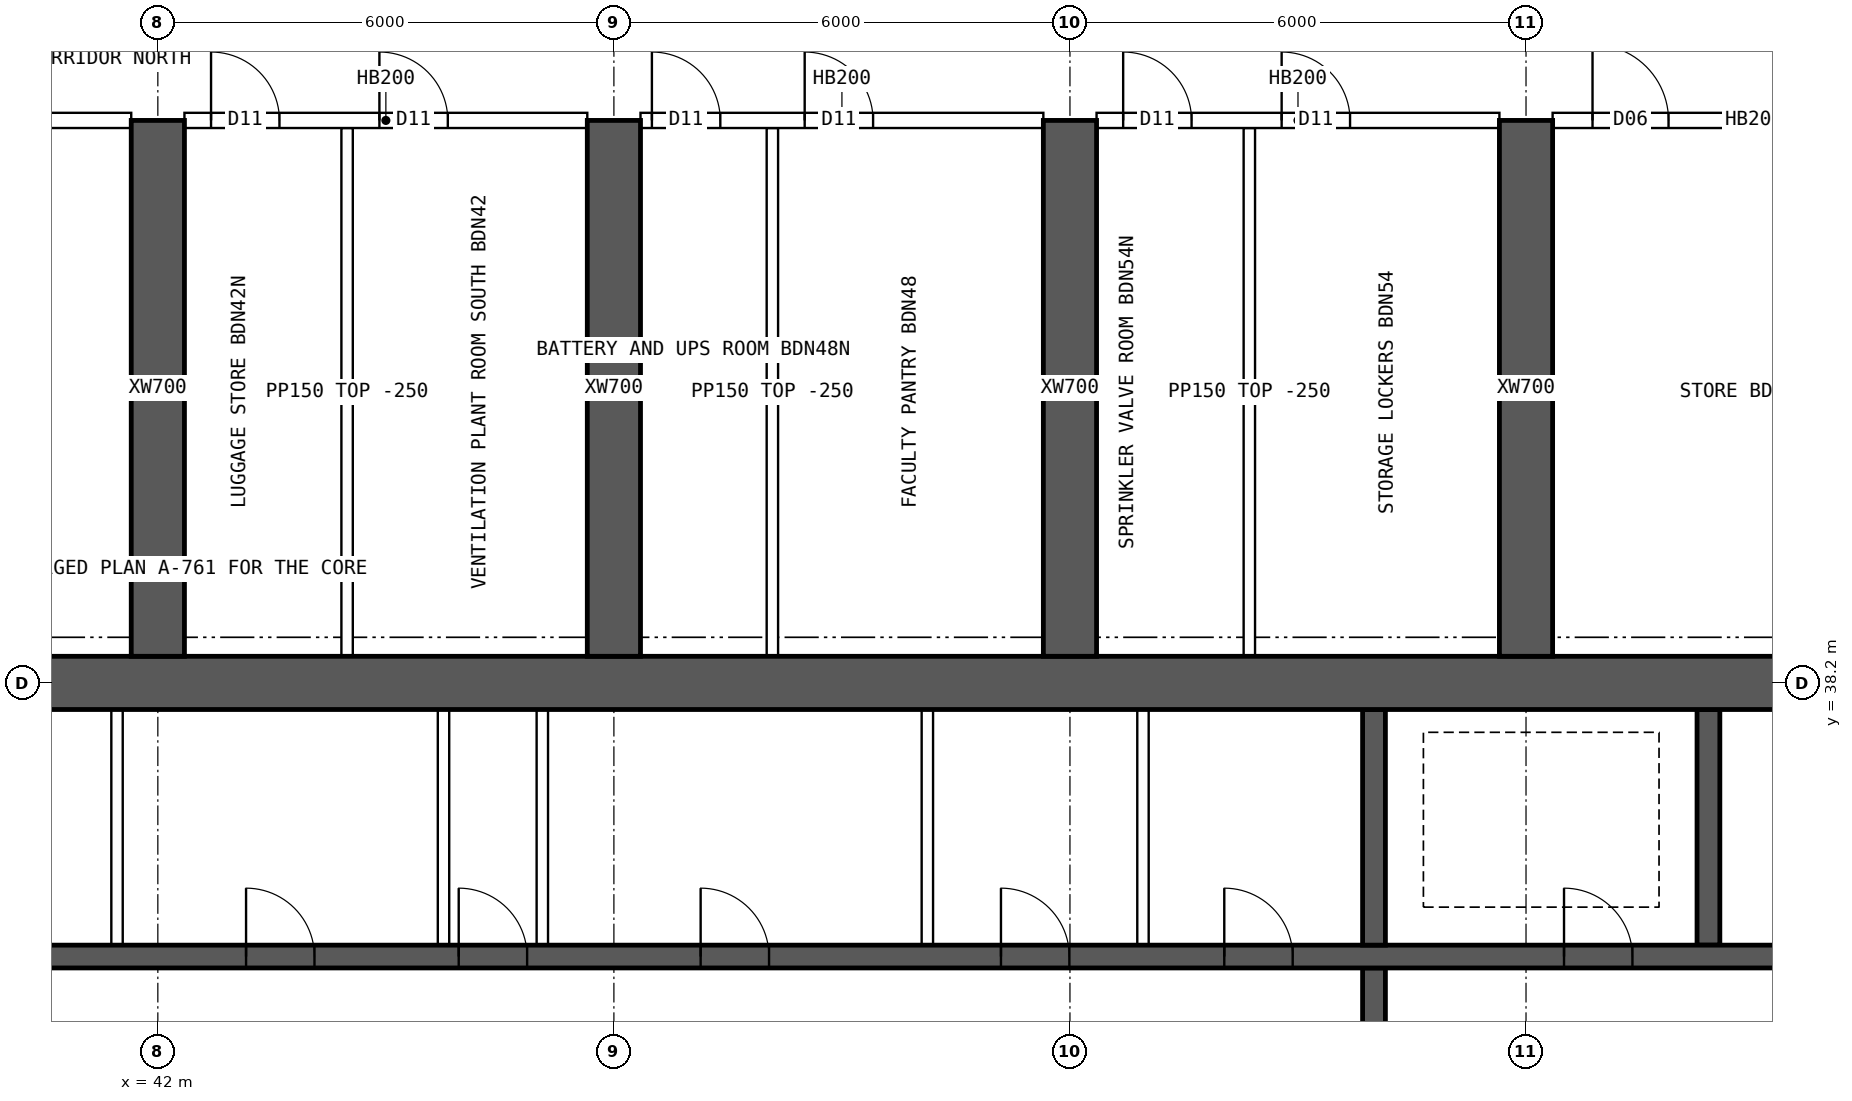
"""IFC4 building model, lengths in metres.
Left out: names, types, materials, properties, quantities, classifications, styles, units other than length and angle.
Written with IfcOpenShell. Run it as: python <this file> out.ifc"""

import sys

from ifc_helpers import new_model, si_unit, direction, frame, frame_2d, origin, place, context, subcontext, project, spatial, rectangle, extrude, element, fill, save


model = new_model("IFC4")
c1 = context("Model", 3, precision=1e-05, world=origin(), true_north=direction((0.0, 1.0)))
c2 = subcontext(c1, "Body", "Model", "MODEL_VIEW")
j1 = project(units=[si_unit("LENGTHUNIT", "METRE"), si_unit("PLANEANGLEUNIT", "RADIAN")], contexts=[c1])
p1 = place(None, origin())
s1 = spatial("IfcSite", under=j1, at=p1, CompositionType="ELEMENT")
p2 = place(p1, origin())
s2 = spatial("IfcBuilding", under=s1, at=p2, CompositionType="ELEMENT")
p3 = place(p2, frame((0.0, 0.0, 235.3)))
s3 = spatial("IfcBuildingStorey", under=s2, at=p3, CompositionType="ELEMENT", Elevation=235.3)
p4 = place(p3, frame((18.0, 38.2, 0.0), z_axis=(0.0, 0.0, 1.0), x_axis=(1.0, 0.0, 0.0)))
e1 = element("IfcWall", 1, at=p4, inside=s3, PredefinedType="SHEAR", context=c2, shape_type="SweptSolid", body=[
    extrude(rectangle(XDim=48.0, YDim=0.7, at=frame_2d((24.0, 0.0))), origin(), (0.0, 0.0, 1.0), 3.75),
])
p5 = place(p3, frame((18.35, 34.6, 0.0), z_axis=(0.0, 0.0, 1.0), x_axis=(1.0, 0.0, 0.0)))
e2 = element("IfcWall", 2, at=p5, inside=s3, PredefinedType="SHEAR", context=c2, shape_type="SweptSolid", body=[
    extrude(rectangle(XDim=47.3, YDim=0.3, at=frame_2d((23.65, 0.0))), origin(), (0.0, 0.0, 1.0), 3.75),
])
p6 = place(p5, frame((0.9, 0.0, 0.0)))
e3 = element("IfcOpeningElement", 3, at=p6, cuts=e2, PredefinedType="OPENING", context=c2, shape_type="SweptSolid", body=[
    extrude(rectangle(XDim=1.1, YDim=2.1, at=frame_2d((0.55, 1.05))), frame((0.0, 0.16, 0.0), z_axis=(0.0, -1.0, 0.0), x_axis=(1.0, 0.0, 0.0)), (0.0, 0.0, 1.0), 0.32),
])
p7 = place(p5, frame((45.3, 0.0, 0.0)))
e4 = element("IfcOpeningElement", 4, at=p7, cuts=e2, PredefinedType="OPENING", context=c2, shape_type="SweptSolid", body=[
    extrude(rectangle(XDim=1.1, YDim=2.1, at=frame_2d((0.55, 1.05))), frame((0.0, 0.16, 0.0), z_axis=(0.0, -1.0, 0.0), x_axis=(1.0, 0.0, 0.0)), (0.0, 0.0, 1.0), 0.32),
])
p8 = place(p5, frame((4.25, 0.0, 0.0)))
e5 = element("IfcOpeningElement", 5, at=p8, cuts=e2, PredefinedType="OPENING", context=c2, shape_type="SweptSolid", body=[
    extrude(rectangle(XDim=0.9, YDim=2.1, at=frame_2d((0.45, 1.05))), frame((0.0, 0.16, 0.0), z_axis=(0.0, -1.0, 0.0), x_axis=(1.0, 0.0, 0.0)), (0.0, 0.0, 1.0), 0.32),
])
p9 = place(p5, frame((42.15, 0.0, 0.0)))
e6 = element("IfcOpeningElement", 6, at=p9, cuts=e2, PredefinedType="OPENING", context=c2, shape_type="SweptSolid", body=[
    extrude(rectangle(XDim=0.9, YDim=2.1, at=frame_2d((0.45, 1.05))), frame((0.0, 0.16, 0.0), z_axis=(0.0, -1.0, 0.0), x_axis=(1.0, 0.0, 0.0)), (0.0, 0.0, 1.0), 0.32),
])
p10 = place(p5, frame((9.025, 0.0, 0.0)))
e7 = element("IfcOpeningElement", 7, at=p10, cuts=e2, PredefinedType="OPENING", context=c2, shape_type="SweptSolid", body=[
    extrude(rectangle(XDim=0.9, YDim=2.1, at=frame_2d((0.45, 1.05))), frame((0.0, 0.16, 0.0), z_axis=(0.0, -1.0, 0.0), x_axis=(1.0, 0.0, 0.0)), (0.0, 0.0, 1.0), 0.32),
])
p11 = place(p5, frame((12.999, 0.0, 0.0)))
e8 = element("IfcOpeningElement", 8, at=p11, cuts=e2, PredefinedType="OPENING", context=c2, shape_type="SweptSolid", body=[
    extrude(rectangle(XDim=0.9, YDim=2.1, at=frame_2d((0.45, 1.05))), frame((0.0, 0.16, 0.0), z_axis=(0.0, -1.0, 0.0), x_axis=(1.0, 0.0, 0.0)), (0.0, 0.0, 1.0), 0.32),
])
p12 = place(p5, frame((16.646, 0.0, 0.0)))
e9 = element("IfcOpeningElement", 9, at=p12, cuts=e2, PredefinedType="OPENING", context=c2, shape_type="SweptSolid", body=[
    extrude(rectangle(XDim=0.9, YDim=2.1, at=frame_2d((0.45, 1.05))), frame((0.0, 0.16, 0.0), z_axis=(0.0, -1.0, 0.0), x_axis=(1.0, 0.0, 0.0)), (0.0, 0.0, 1.0), 0.32),
])
p13 = place(p5, frame((20.405, 0.0, 0.0)))
e10 = element("IfcOpeningElement", 10, at=p13, cuts=e2, PredefinedType="OPENING", context=c2, shape_type="SweptSolid", body=[
    extrude(rectangle(XDim=0.9, YDim=2.1, at=frame_2d((0.45, 1.05))), frame((0.0, 0.16, 0.0), z_axis=(0.0, -1.0, 0.0), x_axis=(1.0, 0.0, 0.0)), (0.0, 0.0, 1.0), 0.32),
])
p14 = place(p5, frame((24.811, 0.0, 0.0)))
e11 = element("IfcOpeningElement", 11, at=p14, cuts=e2, PredefinedType="OPENING", context=c2, shape_type="SweptSolid", body=[
    extrude(rectangle(XDim=0.9, YDim=2.1, at=frame_2d((0.45, 1.05))), frame((0.0, 0.16, 0.0), z_axis=(0.0, -1.0, 0.0), x_axis=(1.0, 0.0, 0.0)), (0.0, 0.0, 1.0), 0.32),
])
p15 = place(p5, frame((27.608, 0.0, 0.0)))
e12 = element("IfcOpeningElement", 12, at=p15, cuts=e2, PredefinedType="OPENING", context=c2, shape_type="SweptSolid", body=[
    extrude(rectangle(XDim=0.9, YDim=2.1, at=frame_2d((0.45, 1.05))), frame((0.0, 0.16, 0.0), z_axis=(0.0, -1.0, 0.0), x_axis=(1.0, 0.0, 0.0)), (0.0, 0.0, 1.0), 0.32),
])
p16 = place(p5, frame((30.791, 0.0, 0.0)))
e13 = element("IfcOpeningElement", 13, at=p16, cuts=e2, PredefinedType="OPENING", context=c2, shape_type="SweptSolid", body=[
    extrude(rectangle(XDim=0.9, YDim=2.1, at=frame_2d((0.45, 1.05))), frame((0.0, 0.16, 0.0), z_axis=(0.0, -1.0, 0.0), x_axis=(1.0, 0.0, 0.0)), (0.0, 0.0, 1.0), 0.32),
])
p17 = place(p5, frame((34.742, 0.0, 0.0)))
e14 = element("IfcOpeningElement", 14, at=p17, cuts=e2, PredefinedType="OPENING", context=c2, shape_type="SweptSolid", body=[
    extrude(rectangle(XDim=0.9, YDim=2.1, at=frame_2d((0.45, 1.05))), frame((0.0, 0.16, 0.0), z_axis=(0.0, -1.0, 0.0), x_axis=(1.0, 0.0, 0.0)), (0.0, 0.0, 1.0), 0.32),
])
p18 = place(p5, frame((37.68, 0.0, 0.0)))
e15 = element("IfcOpeningElement", 15, at=p18, cuts=e2, PredefinedType="OPENING", context=c2, shape_type="SweptSolid", body=[
    extrude(rectangle(XDim=0.9, YDim=2.1, at=frame_2d((0.45, 1.05))), frame((0.0, 0.16, 0.0), z_axis=(0.0, -1.0, 0.0), x_axis=(1.0, 0.0, 0.0)), (0.0, 0.0, 1.0), 0.32),
])
p19 = place(p3, frame((58.0, 30.55, 0.0), z_axis=(0.0, 0.0, 1.0), x_axis=(0.0, 1.0, 0.0)))
e16 = element("IfcWall", 16, at=p19, inside=s3, PredefinedType="SHEAR", context=c2, shape_type="SweptSolid", body=[
    extrude(rectangle(XDim=3.9, YDim=0.3, at=frame_2d((1.95, 0.0))), origin(), (0.0, 0.0, 1.0), 3.75),
])
p20 = place(p19, frame((1.4, 0.0, 0.0)))
e17 = element("IfcOpeningElement", 17, at=p20, cuts=e16, PredefinedType="OPENING", context=c2, shape_type="SweptSolid", body=[
    extrude(rectangle(XDim=1.2, YDim=2.1, at=frame_2d((0.6, 1.05))), frame((0.0, 0.16, 0.0), z_axis=(0.0, -1.0, 0.0), x_axis=(1.0, 0.0, 0.0)), (0.0, 0.0, 1.0), 0.32),
])
for number, where, z_axis, x_axis in (
    (18, (62.4, 34.75, 0.0), (0.0, 0.0, 1.0), (0.0, 1.0, 0.0)),
    (19, (58.0, 34.75, 0.0), (0.0, 0.0, 1.0), (0.0, 1.0, 0.0)),
):
    element("IfcWall", number, at=place(p3, frame(where, z_axis=z_axis, x_axis=x_axis)), inside=s3, PredefinedType="SHEAR", context=c2, shape_type="SweptSolid", body=[
        extrude(rectangle(XDim=3.1, YDim=0.3, at=frame_2d((1.55, 0.0))), origin(), (0.0, 0.0, 1.0), 3.75),
    ])
for number, where, z_axis, x_axis in (
    (20, (42.0, 38.55, 0.0), (0.0, 0.0, 1.0), (0.0, 1.0, 0.0)),
    (21, (48.0, 38.55, 0.0), (0.0, 0.0, 1.0), (0.0, 1.0, 0.0)),
    (22, (54.0, 38.55, 0.0), (0.0, 0.0, 1.0), (0.0, 1.0, 0.0)),
    (23, (60.0, 38.55, 0.0), (0.0, 0.0, 1.0), (0.0, 1.0, 0.0)),
):
    element("IfcWall", number, at=place(p3, frame(where, z_axis=z_axis, x_axis=x_axis)), inside=s3, PredefinedType="SHEAR", context=c2, shape_type="SweptSolid", body=[
        extrude(rectangle(XDim=7.05, YDim=0.7, at=frame_2d((3.525, 0.0))), origin(), (0.0, 0.0, 1.0), 3.75),
    ])
for number, where, z_axis, x_axis in (
    (24, (41.463, 34.75, 0.0), (0.0, 0.0, 1.0), (0.0, 1.0, 0.0)),
    (25, (45.758, 34.75, 0.0), (0.0, 0.0, 1.0), (0.0, 1.0, 0.0)),
    (26, (47.058, 34.75, 0.0), (0.0, 0.0, 1.0), (0.0, 1.0, 0.0)),
    (27, (52.124, 34.75, 0.0), (0.0, 0.0, 1.0), (0.0, 1.0, 0.0)),
    (28, (54.961, 34.75, 0.0), (0.0, 0.0, 1.0), (0.0, 1.0, 0.0)),
):
    element("IfcWall", number, at=place(p3, frame(where, z_axis=z_axis, x_axis=x_axis)), inside=s3, PredefinedType="SOLIDWALL", context=c2, shape_type="SweptSolid", body=[
        extrude(rectangle(XDim=3.1, YDim=0.15, at=frame_2d((1.55, 0.0))), origin(), (0.0, 0.0, 1.0), 3.5),
    ])
p21 = place(p3, frame((36.35, 45.6, 0.0), z_axis=(0.0, 0.0, 1.0), x_axis=(1.0, 0.0, 0.0)))
e29 = element("IfcWall", 29, at=p21, inside=s3, PredefinedType="SOLIDWALL", context=c2, shape_type="SweptSolid", body=[
    extrude(rectangle(XDim=5.3, YDim=0.2, at=frame_2d((2.65, 0.0))), origin(), (0.0, 0.0, 1.0), 3.5),
])
p22 = place(p21, frame((0.15, 0.0, 0.0)))
e30 = element("IfcOpeningElement", 30, at=p22, cuts=e29, PredefinedType="OPENING", context=c2, shape_type="SweptSolid", body=[
    extrude(rectangle(XDim=0.9, YDim=2.1, at=frame_2d((0.45, 1.05))), frame((0.0, 0.11, 0.0), z_axis=(0.0, -1.0, 0.0), x_axis=(1.0, 0.0, 0.0)), (0.0, 0.0, 1.0), 0.22),
])
p23 = place(p21, frame((2.34, 0.0, 0.0)))
e31 = element("IfcOpeningElement", 31, at=p23, cuts=e29, PredefinedType="OPENING", context=c2, shape_type="SweptSolid", body=[
    extrude(rectangle(XDim=0.9, YDim=2.1, at=frame_2d((0.45, 1.05))), frame((0.0, 0.11, 0.0), z_axis=(0.0, -1.0, 0.0), x_axis=(1.0, 0.0, 0.0)), (0.0, 0.0, 1.0), 0.22),
])
p24 = place(p3, frame((42.35, 45.6, 0.0), z_axis=(0.0, 0.0, 1.0), x_axis=(1.0, 0.0, 0.0)))
e32 = element("IfcWall", 32, at=p24, inside=s3, PredefinedType="SOLIDWALL", context=c2, shape_type="SweptSolid", body=[
    extrude(rectangle(XDim=5.3, YDim=0.2, at=frame_2d((2.65, 0.0))), origin(), (0.0, 0.0, 1.0), 3.5),
])
p25 = place(p24, frame((0.35, 0.0, 0.0)))
e33 = element("IfcOpeningElement", 33, at=p25, cuts=e32, PredefinedType="OPENING", context=c2, shape_type="SweptSolid", body=[
    extrude(rectangle(XDim=0.9, YDim=2.1, at=frame_2d((0.45, 1.05))), frame((0.0, 0.11, 0.0), z_axis=(0.0, -1.0, 0.0), x_axis=(1.0, 0.0, 0.0)), (0.0, 0.0, 1.0), 0.22),
])
p26 = place(p24, frame((2.565, 0.0, 0.0)))
e34 = element("IfcOpeningElement", 34, at=p26, cuts=e32, PredefinedType="OPENING", context=c2, shape_type="SweptSolid", body=[
    extrude(rectangle(XDim=0.9, YDim=2.1, at=frame_2d((0.45, 1.05))), frame((0.0, 0.11, 0.0), z_axis=(0.0, -1.0, 0.0), x_axis=(1.0, 0.0, 0.0)), (0.0, 0.0, 1.0), 0.22),
])
p27 = place(p3, frame((48.35, 45.6, 0.0), z_axis=(0.0, 0.0, 1.0), x_axis=(1.0, 0.0, 0.0)))
e35 = element("IfcWall", 35, at=p27, inside=s3, PredefinedType="SOLIDWALL", context=c2, shape_type="SweptSolid", body=[
    extrude(rectangle(XDim=5.3, YDim=0.2, at=frame_2d((2.65, 0.0))), origin(), (0.0, 0.0, 1.0), 3.5),
])
p28 = place(p27, frame((0.15, 0.0, 0.0)))
e36 = element("IfcOpeningElement", 36, at=p28, cuts=e35, PredefinedType="OPENING", context=c2, shape_type="SweptSolid", body=[
    extrude(rectangle(XDim=0.9, YDim=2.1, at=frame_2d((0.45, 1.05))), frame((0.0, 0.11, 0.0), z_axis=(0.0, -1.0, 0.0), x_axis=(1.0, 0.0, 0.0)), (0.0, 0.0, 1.0), 0.22),
])
p29 = place(p27, frame((2.16, 0.0, 0.0)))
e37 = element("IfcOpeningElement", 37, at=p29, cuts=e35, PredefinedType="OPENING", context=c2, shape_type="SweptSolid", body=[
    extrude(rectangle(XDim=0.9, YDim=2.1, at=frame_2d((0.45, 1.05))), frame((0.0, 0.11, 0.0), z_axis=(0.0, -1.0, 0.0), x_axis=(1.0, 0.0, 0.0)), (0.0, 0.0, 1.0), 0.22),
])
p30 = place(p3, frame((54.35, 45.6, 0.0), z_axis=(0.0, 0.0, 1.0), x_axis=(1.0, 0.0, 0.0)))
e38 = element("IfcWall", 38, at=p30, inside=s3, PredefinedType="SOLIDWALL", context=c2, shape_type="SweptSolid", body=[
    extrude(rectangle(XDim=5.3, YDim=0.2, at=frame_2d((2.65, 0.0))), origin(), (0.0, 0.0, 1.0), 3.5),
])
p31 = place(p30, frame((0.35, 0.0, 0.0)))
e39 = element("IfcOpeningElement", 39, at=p31, cuts=e38, PredefinedType="OPENING", context=c2, shape_type="SweptSolid", body=[
    extrude(rectangle(XDim=0.9, YDim=2.1, at=frame_2d((0.45, 1.05))), frame((0.0, 0.11, 0.0), z_axis=(0.0, -1.0, 0.0), x_axis=(1.0, 0.0, 0.0)), (0.0, 0.0, 1.0), 0.22),
])
p32 = place(p30, frame((2.435, 0.0, 0.0)))
e40 = element("IfcOpeningElement", 40, at=p32, cuts=e38, PredefinedType="OPENING", context=c2, shape_type="SweptSolid", body=[
    extrude(rectangle(XDim=0.9, YDim=2.1, at=frame_2d((0.45, 1.05))), frame((0.0, 0.11, 0.0), z_axis=(0.0, -1.0, 0.0), x_axis=(1.0, 0.0, 0.0)), (0.0, 0.0, 1.0), 0.22),
])
p33 = place(p3, frame((60.35, 45.6, 0.0), z_axis=(0.0, 0.0, 1.0), x_axis=(1.0, 0.0, 0.0)))
e41 = element("IfcWall", 41, at=p33, inside=s3, PredefinedType="SOLIDWALL", context=c2, shape_type="SweptSolid", body=[
    extrude(rectangle(XDim=5.3, YDim=0.2, at=frame_2d((2.65, 0.0))), origin(), (0.0, 0.0, 1.0), 3.5),
])
p34 = place(p33, frame((0.525, 0.0, 0.0)))
e42 = element("IfcOpeningElement", 42, at=p34, cuts=e41, PredefinedType="OPENING", context=c2, shape_type="SweptSolid", body=[
    extrude(rectangle(XDim=1.0, YDim=2.1, at=frame_2d((0.5, 1.05))), frame((0.0, 0.11, 0.0), z_axis=(0.0, -1.0, 0.0), x_axis=(1.0, 0.0, 0.0)), (0.0, 0.0, 1.0), 0.22),
])
for number, where, z_axis, x_axis in (
    (43, (44.49, 38.55, 0.0), (0.0, 0.0, 1.0), (0.0, 1.0, 0.0)),
    (44, (50.085, 38.55, 0.0), (0.0, 0.0, 1.0), (0.0, 1.0, 0.0)),
    (45, (56.36, 38.55, 0.0), (0.0, 0.0, 1.0), (0.0, 1.0, 0.0)),
):
    element("IfcWall", number, at=place(p3, frame(where, z_axis=z_axis, x_axis=x_axis)), inside=s3, PredefinedType="PARTITIONING", context=c2, shape_type="SweptSolid", body=[
        extrude(rectangle(XDim=6.95, YDim=0.15, at=frame_2d((3.475, 0.0))), origin(), (0.0, 0.0, 1.0), 3.5),
    ])
p35 = place(p9, origin())
e46 = element("IfcDoor", 46, at=p35, inside=s3, OperationType="SINGLE_SWING_LEFT", PredefinedType="DOOR", context=c2, shape_type="SweptSolid", body=[
    extrude(rectangle(XDim=0.9, YDim=2.1, at=frame_2d((0.45, 1.05))), frame((0.0, 0.025, 0.0), z_axis=(0.0, -1.0, 0.0), x_axis=(1.0, 0.0, 0.0)), (0.0, 0.0, 1.0), 0.05),
])
fill(e6, e46)
p36 = place(p14, origin())
e47 = element("IfcDoor", 47, at=p36, inside=s3, OperationType="SINGLE_SWING_LEFT", PredefinedType="DOOR", context=c2, shape_type="SweptSolid", body=[
    extrude(rectangle(XDim=0.9, YDim=2.1, at=frame_2d((0.45, 1.05))), frame((0.0, 0.025, 0.0), z_axis=(0.0, -1.0, 0.0), x_axis=(1.0, 0.0, 0.0)), (0.0, 0.0, 1.0), 0.05),
])
fill(e11, e47)
p37 = place(p15, origin())
e48 = element("IfcDoor", 48, at=p37, inside=s3, OperationType="SINGLE_SWING_LEFT", PredefinedType="DOOR", context=c2, shape_type="SweptSolid", body=[
    extrude(rectangle(XDim=0.9, YDim=2.1, at=frame_2d((0.45, 1.05))), frame((0.0, 0.025, 0.0), z_axis=(0.0, -1.0, 0.0), x_axis=(1.0, 0.0, 0.0)), (0.0, 0.0, 1.0), 0.05),
])
fill(e12, e48)
p38 = place(p16, origin())
e49 = element("IfcDoor", 49, at=p38, inside=s3, OperationType="SINGLE_SWING_LEFT", PredefinedType="DOOR", context=c2, shape_type="SweptSolid", body=[
    extrude(rectangle(XDim=0.9, YDim=2.1, at=frame_2d((0.45, 1.05))), frame((0.0, 0.025, 0.0), z_axis=(0.0, -1.0, 0.0), x_axis=(1.0, 0.0, 0.0)), (0.0, 0.0, 1.0), 0.05),
])
fill(e13, e49)
p39 = place(p17, origin())
e50 = element("IfcDoor", 50, at=p39, inside=s3, OperationType="SINGLE_SWING_LEFT", PredefinedType="DOOR", context=c2, shape_type="SweptSolid", body=[
    extrude(rectangle(XDim=0.9, YDim=2.1, at=frame_2d((0.45, 1.05))), frame((0.0, 0.025, 0.0), z_axis=(0.0, -1.0, 0.0), x_axis=(1.0, 0.0, 0.0)), (0.0, 0.0, 1.0), 0.05),
])
fill(e14, e50)
p40 = place(p18, origin())
e51 = element("IfcDoor", 51, at=p40, inside=s3, OperationType="SINGLE_SWING_LEFT", PredefinedType="DOOR", context=c2, shape_type="SweptSolid", body=[
    extrude(rectangle(XDim=0.9, YDim=2.1, at=frame_2d((0.45, 1.05))), frame((0.0, 0.025, 0.0), z_axis=(0.0, -1.0, 0.0), x_axis=(1.0, 0.0, 0.0)), (0.0, 0.0, 1.0), 0.05),
])
fill(e15, e51)
p41 = place(p25, origin())
e52 = element("IfcDoor", 52, at=p41, inside=s3, OperationType="SINGLE_SWING_LEFT", PredefinedType="DOOR", context=c2, shape_type="SweptSolid", body=[
    extrude(rectangle(XDim=0.9, YDim=2.1, at=frame_2d((0.45, 1.05))), frame((0.0, 0.025, 0.0), z_axis=(0.0, -1.0, 0.0), x_axis=(1.0, 0.0, 0.0)), (0.0, 0.0, 1.0), 0.05),
])
fill(e33, e52)
p42 = place(p26, origin())
e53 = element("IfcDoor", 53, at=p42, inside=s3, OperationType="SINGLE_SWING_LEFT", PredefinedType="DOOR", context=c2, shape_type="SweptSolid", body=[
    extrude(rectangle(XDim=0.9, YDim=2.1, at=frame_2d((0.45, 1.05))), frame((0.0, 0.025, 0.0), z_axis=(0.0, -1.0, 0.0), x_axis=(1.0, 0.0, 0.0)), (0.0, 0.0, 1.0), 0.05),
])
fill(e34, e53)
p43 = place(p28, origin())
e54 = element("IfcDoor", 54, at=p43, inside=s3, OperationType="SINGLE_SWING_LEFT", PredefinedType="DOOR", context=c2, shape_type="SweptSolid", body=[
    extrude(rectangle(XDim=0.9, YDim=2.1, at=frame_2d((0.45, 1.05))), frame((0.0, 0.025, 0.0), z_axis=(0.0, -1.0, 0.0), x_axis=(1.0, 0.0, 0.0)), (0.0, 0.0, 1.0), 0.05),
])
fill(e36, e54)
p44 = place(p29, origin())
e55 = element("IfcDoor", 55, at=p44, inside=s3, OperationType="SINGLE_SWING_LEFT", PredefinedType="DOOR", context=c2, shape_type="SweptSolid", body=[
    extrude(rectangle(XDim=0.9, YDim=2.1, at=frame_2d((0.45, 1.05))), frame((0.0, 0.025, 0.0), z_axis=(0.0, -1.0, 0.0), x_axis=(1.0, 0.0, 0.0)), (0.0, 0.0, 1.0), 0.05),
])
fill(e37, e55)
p45 = place(p31, origin())
e56 = element("IfcDoor", 56, at=p45, inside=s3, OperationType="SINGLE_SWING_LEFT", PredefinedType="DOOR", context=c2, shape_type="SweptSolid", body=[
    extrude(rectangle(XDim=0.9, YDim=2.1, at=frame_2d((0.45, 1.05))), frame((0.0, 0.025, 0.0), z_axis=(0.0, -1.0, 0.0), x_axis=(1.0, 0.0, 0.0)), (0.0, 0.0, 1.0), 0.05),
])
fill(e39, e56)
p46 = place(p32, origin())
e57 = element("IfcDoor", 57, at=p46, inside=s3, OperationType="SINGLE_SWING_LEFT", PredefinedType="DOOR", context=c2, shape_type="SweptSolid", body=[
    extrude(rectangle(XDim=0.9, YDim=2.1, at=frame_2d((0.45, 1.05))), frame((0.0, 0.025, 0.0), z_axis=(0.0, -1.0, 0.0), x_axis=(1.0, 0.0, 0.0)), (0.0, 0.0, 1.0), 0.05),
])
fill(e40, e57)
p47 = place(p34, origin())
e58 = element("IfcDoor", 58, at=p47, inside=s3, OperationType="SINGLE_SWING_LEFT", PredefinedType="DOOR", context=c2, shape_type="SweptSolid", body=[
    extrude(rectangle(XDim=1.0, YDim=2.1, at=frame_2d((0.5, 1.05))), frame((0.0, 0.025, 0.0), z_axis=(0.0, -1.0, 0.0), x_axis=(1.0, 0.0, 0.0)), (0.0, 0.0, 1.0), 0.05),
])
fill(e42, e58)
save(model, sys.argv[1])
